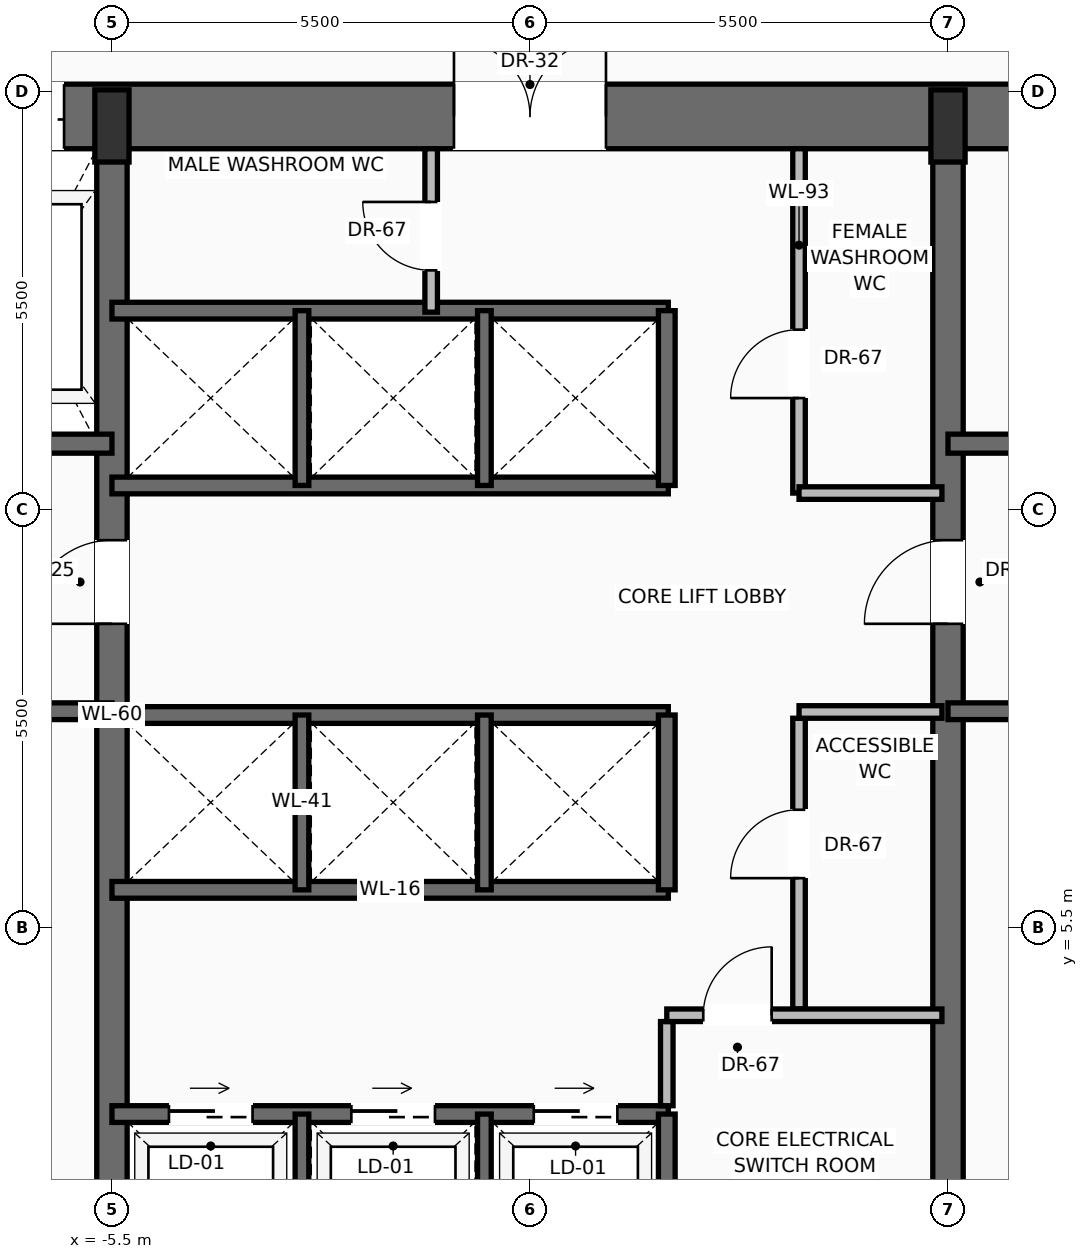
"""IFC4 building model, lengths in metres.
Left out: names, types, materials, properties, quantities, classifications, styles, units other than length and angle.
Written with IfcOpenShell. Run it as: python <this file> out.ifc"""

import sys

from ifc_helpers import new_model, si_unit, direction, frame, frame_2d, origin, origin_2d, place, context, subcontext, project, spatial, rectangle, extrude, source, transform, mapped, element, fill, save


model = new_model("IFC4")
c1 = context("Model", 3, precision=1e-05, world=origin(), true_north=direction((0.0, 1.0)))
c2 = subcontext(c1, "Body", "Model", "MODEL_VIEW")
j1 = project(units=[si_unit("LENGTHUNIT", "METRE"), si_unit("PLANEANGLEUNIT", "RADIAN")], contexts=[c1])
p1 = place(None, origin())
s1 = spatial("IfcSite", under=j1, at=p1, CompositionType="ELEMENT")
p2 = place(p1, origin())
s2 = spatial("IfcBuilding", under=s1, at=p2, CompositionType="ELEMENT")
p3 = place(p2, frame((0.0, 0.0, 34.9)))
s3 = spatial("IfcBuildingStorey", under=s2, at=p3, CompositionType="ELEMENT", Elevation=34.9)
p4 = place(p3, frame((-11.0, 16.175, 0.0), z_axis=(0.0, 0.0, 1.0), x_axis=(1.0, 0.0, 0.0)))
e1 = element("IfcWall", 1, at=p4, inside=s3, PredefinedType="SHEAR", context=c2, shape_type="SweptSolid", body=[
    extrude(rectangle(XDim=22.0, YDim=0.85, at=frame_2d((11.0, 0.0))), origin(), (0.0, 0.0, 1.0), 3.45),
])
p5 = place(p4, frame((3.57, 0.0, 0.0)))
e2 = element("IfcOpeningElement", 2, at=p5, cuts=e1, PredefinedType="OPENING", context=c2, shape_type="SweptSolid", body=[
    extrude(rectangle(XDim=1.3, YDim=2.3, at=frame_2d((0.65, 1.15))), frame((0.0, 0.435, 0.0), z_axis=(0.0, -1.0, 0.0), x_axis=(1.0, 0.0, 0.0)), (0.0, 0.0, 1.0), 0.87),
])
p6 = place(p4, frame((10.0, 0.0, 0.0)))
e3 = element("IfcOpeningElement", 3, at=p6, cuts=e1, PredefinedType="OPENING", context=c2, shape_type="SweptSolid", body=[
    extrude(rectangle(XDim=2.0, YDim=2.4, at=frame_2d((1.0, 1.2))), frame((0.0, 0.435, 0.0), z_axis=(0.0, -1.0, 0.0), x_axis=(1.0, 0.0, 0.0)), (0.0, 0.0, 1.0), 0.87),
])
p7 = place(p3, frame((-5.5, 0.425, 0.0), z_axis=(0.0, 0.0, 1.0), x_axis=(0.0, 1.0, 0.0)))
e4 = element("IfcWall", 4, at=p7, inside=s3, PredefinedType="SHEAR", context=c2, shape_type="SweptSolid", body=[
    extrude(rectangle(XDim=15.75, YDim=0.4, at=frame_2d((7.875, 0.0))), origin(), (0.0, 0.0, 1.0), 3.45),
])
p8 = place(p7, frame((9.075, 0.0, 0.0)))
e5 = element("IfcOpeningElement", 5, at=p8, cuts=e4, PredefinedType="OPENING", context=c2, shape_type="SweptSolid", body=[
    extrude(rectangle(XDim=1.1, YDim=2.2, at=frame_2d((0.55, 1.1))), frame((0.0, 0.21, 0.0), z_axis=(0.0, -1.0, 0.0), x_axis=(1.0, 0.0, 0.0)), (0.0, 0.0, 1.0), 0.42),
])
p9 = place(p3, frame((5.5, 0.425, 0.0), z_axis=(0.0, 0.0, 1.0), x_axis=(0.0, 1.0, 0.0)))
e6 = element("IfcWall", 6, at=p9, inside=s3, PredefinedType="SHEAR", context=c2, shape_type="SweptSolid", body=[
    extrude(rectangle(XDim=15.75, YDim=0.4, at=frame_2d((7.875, 0.0))), origin(), (0.0, 0.0, 1.0), 3.45),
])
p10 = place(p9, frame((9.075, 0.0, 0.0)))
e7 = element("IfcOpeningElement", 7, at=p10, cuts=e6, PredefinedType="OPENING", context=c2, shape_type="SweptSolid", body=[
    extrude(rectangle(XDim=1.1, YDim=2.2, at=frame_2d((0.55, 1.1))), frame((0.0, 0.21, 0.0), z_axis=(0.0, -1.0, 0.0), x_axis=(1.0, 0.0, 0.0)), (0.0, 0.0, 1.0), 0.42),
])
m1 = source(origin(), c2, "Body", "SweptSolid", [
    extrude(rectangle(XDim=0.45, YDim=0.95, at=origin_2d()), origin(), (0.0, 0.0, 1.0), 3.7),
])
for number, where, z_axis, x_axis in (
    (8, (-5.5, 16.05, 0.0), (0.0, 0.0, 1.0), (1.0, 0.0, 0.0)),
    (9, (5.5, 16.05, 0.0), (0.0, 0.0, 1.0), (1.0, 0.0, 0.0)),
):
    element("IfcColumn", number, at=place(p3, frame(where, z_axis=z_axis, x_axis=x_axis)), inside=s3, PredefinedType="PILASTER", context=c2, shape_type="MappedRepresentation", body=[
        mapped(m1, transform((0.0, 0.0, 0.0), scale=1.0)),
    ])
p11 = place(p3, frame((-5.5, 8.35, 0.0), z_axis=(0.0, 0.0, 1.0), x_axis=(-1.0, 0.0, 0.0)))
e10 = element("IfcWall", 10, at=p11, inside=s3, PredefinedType="SOLIDWALL", context=c2, shape_type="SweptSolid", body=[
    extrude(rectangle(XDim=4.65, YDim=0.22, at=frame_2d((2.325, 0.0))), origin(), (0.0, 0.0, 1.0), 3.45),
])
p12 = place(p11, frame((2.5, 0.0, 0.0)))
e11 = element("IfcOpeningElement", 11, at=p12, cuts=e10, PredefinedType="OPENING", context=c2, shape_type="SweptSolid", body=[
    extrude(rectangle(XDim=1.15, YDim=2.2, at=frame_2d((0.575, 1.1))), frame((0.0, 0.12, 0.0), z_axis=(0.0, -1.0, 0.0), x_axis=(1.0, 0.0, 0.0)), (0.0, 0.0, 1.0), 0.24),
])
p13 = place(p3, frame((-5.5, 11.87, 0.0), z_axis=(0.0, 0.0, 1.0), x_axis=(-1.0, 0.0, 0.0)))
e12 = element("IfcWall", 12, at=p13, inside=s3, PredefinedType="SOLIDWALL", context=c2, shape_type="SweptSolid", body=[
    extrude(rectangle(XDim=4.65, YDim=0.25, at=frame_2d((2.325, 0.0))), origin(), (0.0, 0.0, 1.0), 3.45),
])
p14 = place(p13, frame((2.95, 0.0, 0.0)))
e13 = element("IfcOpeningElement", 13, at=p14, cuts=e12, PredefinedType="OPENING", context=c2, shape_type="SweptSolid", body=[
    extrude(rectangle(XDim=1.2, YDim=2.25, at=frame_2d((0.6, 1.125))), frame((0.0, 0.135, 0.0), z_axis=(0.0, -1.0, 0.0), x_axis=(1.0, 0.0, 0.0)), (0.0, 0.0, 1.0), 0.27),
])
p15 = place(p3, frame((10.15, 8.35, 0.0), z_axis=(0.0, 0.0, 1.0), x_axis=(-1.0, 0.0, 0.0)))
e14 = element("IfcWall", 14, at=p15, inside=s3, PredefinedType="SOLIDWALL", context=c2, shape_type="SweptSolid", body=[
    extrude(rectangle(XDim=4.65, YDim=0.22, at=frame_2d((2.325, 0.0))), origin(), (0.0, 0.0, 1.0), 3.45),
])
p16 = place(p15, frame((1.0, 0.0, 0.0)))
e15 = element("IfcOpeningElement", 15, at=p16, cuts=e14, PredefinedType="OPENING", context=c2, shape_type="SweptSolid", body=[
    extrude(rectangle(XDim=1.15, YDim=2.2, at=frame_2d((0.575, 1.1))), frame((0.0, 0.12, 0.0), z_axis=(0.0, -1.0, 0.0), x_axis=(1.0, 0.0, 0.0)), (0.0, 0.0, 1.0), 0.24),
])
p17 = place(p3, frame((10.15, 11.87, 0.0), z_axis=(0.0, 0.0, 1.0), x_axis=(-1.0, 0.0, 0.0)))
e16 = element("IfcWall", 16, at=p17, inside=s3, PredefinedType="SOLIDWALL", context=c2, shape_type="SweptSolid", body=[
    extrude(rectangle(XDim=4.65, YDim=0.25, at=frame_2d((2.325, 0.0))), origin(), (0.0, 0.0, 1.0), 3.45),
])
p18 = place(p17, frame((0.5, 0.0, 0.0)))
e17 = element("IfcOpeningElement", 17, at=p18, cuts=e16, PredefinedType="OPENING", context=c2, shape_type="SweptSolid", body=[
    extrude(rectangle(XDim=1.2, YDim=2.25, at=frame_2d((0.6, 1.125))), frame((0.0, 0.135, 0.0), z_axis=(0.0, -1.0, 0.0), x_axis=(1.0, 0.0, 0.0)), (0.0, 0.0, 1.0), 0.27),
])
p19 = place(p3, frame((-5.5, 3.05, 0.0), z_axis=(0.0, 0.0, 1.0), x_axis=(1.0, 0.0, 0.0)))
e18 = element("IfcWall", 18, at=p19, inside=s3, PredefinedType="SOLIDWALL", context=c2, shape_type="SweptSolid", body=[
    extrude(rectangle(XDim=7.32, YDim=0.22, at=frame_2d((3.66, 0.0))), origin(), (0.0, 0.0, 1.0), 3.45),
])
p20 = place(p19, frame((0.75, 0.0, 0.0)))
e19 = element("IfcOpeningElement", 19, at=p20, cuts=e18, PredefinedType="OPENING", context=c2, shape_type="SweptSolid", body=[
    extrude(rectangle(XDim=1.1, YDim=2.2, at=frame_2d((0.55, 1.1))), frame((0.0, 0.12, 0.0), z_axis=(0.0, -1.0, 0.0), x_axis=(1.0, 0.0, 0.0)), (0.0, 0.0, 1.0), 0.24),
])
p21 = place(p19, frame((3.15, 0.0, 0.0)))
e20 = element("IfcOpeningElement", 20, at=p21, cuts=e18, PredefinedType="OPENING", context=c2, shape_type="SweptSolid", body=[
    extrude(rectangle(XDim=1.1, YDim=2.2, at=frame_2d((0.55, 1.1))), frame((0.0, 0.12, 0.0), z_axis=(0.0, -1.0, 0.0), x_axis=(1.0, 0.0, 0.0)), (0.0, 0.0, 1.0), 0.24),
])
p22 = place(p19, frame((5.55, 0.0, 0.0)))
e21 = element("IfcOpeningElement", 21, at=p22, cuts=e18, PredefinedType="OPENING", context=c2, shape_type="SweptSolid", body=[
    extrude(rectangle(XDim=1.1, YDim=2.2, at=frame_2d((0.55, 1.1))), frame((0.0, 0.12, 0.0), z_axis=(0.0, -1.0, 0.0), x_axis=(1.0, 0.0, 0.0)), (0.0, 0.0, 1.0), 0.24),
])
p23 = place(p3, frame((1.8, 0.85, 0.0), z_axis=(0.0, 0.0, 1.0), x_axis=(0.0, 1.0, 0.0)))
e22 = element("IfcWall", 22, at=p23, inside=s3, PredefinedType="SOLIDWALL", context=c2, shape_type="SweptSolid", body=[
    extrude(rectangle(XDim=2.2, YDim=0.22, at=frame_2d((1.1, 0.0))), origin(), (0.0, 0.0, 1.0), 3.45),
])
for number, where, z_axis, x_axis in (
    (23, (-3.0, 0.85, 0.0), (0.0, 0.0, 1.0), (0.0, 1.0, 0.0)),
    (24, (-0.6, 0.85, 0.0), (0.0, 0.0, 1.0), (0.0, 1.0, 0.0)),
):
    element("IfcWall", number, at=place(p3, frame(where, z_axis=z_axis, x_axis=x_axis)), inside=s3, PredefinedType="SOLIDWALL", context=c2, shape_type="SweptSolid", body=[
        extrude(rectangle(XDim=2.2, YDim=0.18, at=frame_2d((1.1, 0.0))), origin(), (0.0, 0.0, 1.0), 3.45),
    ])
p24 = place(p3, frame((1.8, 3.16, 0.0), z_axis=(0.0, 0.0, 1.0), x_axis=(0.0, 1.0, 0.0)))
e25 = element("IfcWall", 25, at=p24, inside=s3, PredefinedType="PARTITIONING", context=c2, shape_type="SweptSolid", body=[
    extrude(rectangle(XDim=1.108, YDim=0.165, at=frame_2d((0.554, 0.0))), origin(), (0.0, 0.0, 1.0), 3.442),
])
p25 = place(p3, frame((3.54, 4.433, 0.0), z_axis=(0.0, 0.0, 1.0), x_axis=(0.0, 1.0, 0.0)))
e26 = element("IfcWall", 26, at=p25, inside=s3, PredefinedType="PARTITIONING", context=c2, shape_type="SweptSolid", body=[
    extrude(rectangle(XDim=3.825, YDim=0.165, at=frame_2d((1.913, 0.0))), origin(), (0.0, 0.0, 1.0), 3.442),
])
p26 = place(p25, frame((1.721, 0.0, 0.0)))
e27 = element("IfcOpeningElement", 27, at=p26, cuts=e26, PredefinedType="OPENING", context=c2, shape_type="SweptSolid", body=[
    extrude(rectangle(XDim=0.9, YDim=2.1, at=frame_2d((0.45, 1.05))), frame((0.0, 0.093, 0.0), z_axis=(0.0, -1.0, 0.0), x_axis=(1.0, 0.0, 0.0)), (0.0, 0.0, 1.0), 0.185),
])
p27 = place(p3, frame((3.54, 8.34, 0.0), z_axis=(0.0, 0.0, 1.0), x_axis=(1.0, 0.0, 0.0)))
e28 = element("IfcWall", 28, at=p27, inside=s3, PredefinedType="PARTITIONING", context=c2, shape_type="SweptSolid", body=[
    extrude(rectangle(XDim=1.88, YDim=0.165, at=frame_2d((0.94, 0.0))), origin(), (0.0, 0.0, 1.0), 3.442),
])
p28 = place(p3, frame((1.8, 4.35, 0.0), z_axis=(0.0, 0.0, 1.0), x_axis=(1.0, 0.0, 0.0)))
e29 = element("IfcWall", 29, at=p28, inside=s3, PredefinedType="PARTITIONING", context=c2, shape_type="SweptSolid", body=[
    extrude(rectangle(XDim=3.62, YDim=0.165, at=frame_2d((1.81, 0.0))), origin(), (0.0, 0.0, 1.0), 3.442),
])
p29 = place(p28, frame((0.48, 0.0, 0.0)))
e30 = element("IfcOpeningElement", 30, at=p29, cuts=e29, PredefinedType="OPENING", context=c2, shape_type="SweptSolid", body=[
    extrude(rectangle(XDim=0.9, YDim=2.1, at=frame_2d((0.45, 1.05))), frame((0.0, 0.093, 0.0), z_axis=(0.0, -1.0, 0.0), x_axis=(1.0, 0.0, 0.0)), (0.0, 0.0, 1.0), 0.185),
])
for number, where, z_axis, x_axis in (
    (31, (-5.5, 6.0, 0.0), (0.0, 0.0, 1.0), (1.0, 0.0, 0.0)),
    (32, (-5.5, 8.3, 0.0), (0.0, 0.0, 1.0), (1.0, 0.0, 0.0)),
):
    element("IfcWall", number, at=place(p3, frame(where, z_axis=z_axis, x_axis=x_axis)), inside=s3, PredefinedType="SOLIDWALL", context=c2, shape_type="SweptSolid", body=[
        extrude(rectangle(XDim=7.32, YDim=0.22, at=frame_2d((3.66, 0.0))), origin(), (0.0, 0.0, 1.0), 3.45),
    ])
p30 = place(p3, frame((1.8, 6.0, 0.0), z_axis=(0.0, 0.0, 1.0), x_axis=(0.0, 1.0, 0.0)))
e33 = element("IfcWall", 33, at=p30, inside=s3, PredefinedType="SOLIDWALL", context=c2, shape_type="SweptSolid", body=[
    extrude(rectangle(XDim=2.3, YDim=0.22, at=frame_2d((1.15, 0.0))), origin(), (0.0, 0.0, 1.0), 3.45),
])
for number, where, z_axis, x_axis in (
    (34, (-3.0, 6.0, 0.0), (0.0, 0.0, 1.0), (0.0, 1.0, 0.0)),
    (35, (-0.6, 6.0, 0.0), (0.0, 0.0, 1.0), (0.0, 1.0, 0.0)),
):
    element("IfcWall", number, at=place(p3, frame(where, z_axis=z_axis, x_axis=x_axis)), inside=s3, PredefinedType="SOLIDWALL", context=c2, shape_type="SweptSolid", body=[
        extrude(rectangle(XDim=2.3, YDim=0.18, at=frame_2d((1.15, 0.0))), origin(), (0.0, 0.0, 1.0), 3.45),
    ])
for number, where, z_axis, x_axis in (
    (36, (-5.5, 11.32, 0.0), (0.0, 0.0, 1.0), (1.0, 0.0, 0.0)),
    (37, (-5.5, 13.62, 0.0), (0.0, 0.0, 1.0), (1.0, 0.0, 0.0)),
):
    element("IfcWall", number, at=place(p3, frame(where, z_axis=z_axis, x_axis=x_axis)), inside=s3, PredefinedType="SOLIDWALL", context=c2, shape_type="SweptSolid", body=[
        extrude(rectangle(XDim=7.32, YDim=0.22, at=frame_2d((3.66, 0.0))), origin(), (0.0, 0.0, 1.0), 3.45),
    ])
p31 = place(p3, frame((1.8, 11.32, 0.0), z_axis=(0.0, 0.0, 1.0), x_axis=(0.0, 1.0, 0.0)))
e38 = element("IfcWall", 38, at=p31, inside=s3, PredefinedType="SOLIDWALL", context=c2, shape_type="SweptSolid", body=[
    extrude(rectangle(XDim=2.3, YDim=0.22, at=frame_2d((1.15, 0.0))), origin(), (0.0, 0.0, 1.0), 3.45),
])
for number, where, z_axis, x_axis in (
    (39, (-3.0, 11.32, 0.0), (0.0, 0.0, 1.0), (0.0, 1.0, 0.0)),
    (40, (-0.6, 11.32, 0.0), (0.0, 0.0, 1.0), (0.0, 1.0, 0.0)),
):
    element("IfcWall", number, at=place(p3, frame(where, z_axis=z_axis, x_axis=x_axis)), inside=s3, PredefinedType="SOLIDWALL", context=c2, shape_type="SweptSolid", body=[
        extrude(rectangle(XDim=2.3, YDim=0.18, at=frame_2d((1.15, 0.0))), origin(), (0.0, 0.0, 1.0), 3.45),
    ])
p32 = place(p3, frame((-1.3, 13.6, 0.0), z_axis=(0.0, 0.0, 1.0), x_axis=(0.0, 1.0, 0.0)))
e41 = element("IfcWall", 41, at=p32, inside=s3, PredefinedType="PARTITIONING", context=c2, shape_type="SweptSolid", body=[
    extrude(rectangle(XDim=2.15, YDim=0.165, at=frame_2d((1.075, 0.0))), origin(), (0.0, 0.0, 1.0), 3.442),
])
p33 = place(p32, frame((0.55, 0.0, 0.0)))
e42 = element("IfcOpeningElement", 42, at=p33, cuts=e41, PredefinedType="OPENING", context=c2, shape_type="SweptSolid", body=[
    extrude(rectangle(XDim=0.9, YDim=2.1, at=frame_2d((0.45, 1.05))), frame((0.0, 0.093, 0.0), z_axis=(0.0, -1.0, 0.0), x_axis=(1.0, 0.0, 0.0)), (0.0, 0.0, 1.0), 0.185),
])
p34 = place(p3, frame((3.54, 11.22, 0.0), z_axis=(0.0, 0.0, 1.0), x_axis=(0.0, 1.0, 0.0)))
e43 = element("IfcWall", 43, at=p34, inside=s3, PredefinedType="PARTITIONING", context=c2, shape_type="SweptSolid", body=[
    extrude(rectangle(XDim=4.53, YDim=0.165, at=frame_2d((2.265, 0.0))), origin(), (0.0, 0.0, 1.0), 3.442),
])
p35 = place(p34, frame((1.25, 0.0, 0.0)))
e44 = element("IfcOpeningElement", 44, at=p35, cuts=e43, PredefinedType="OPENING", context=c2, shape_type="SweptSolid", body=[
    extrude(rectangle(XDim=0.9, YDim=2.1, at=frame_2d((0.45, 1.05))), frame((0.0, 0.093, 0.0), z_axis=(0.0, -1.0, 0.0), x_axis=(1.0, 0.0, 0.0)), (0.0, 0.0, 1.0), 0.185),
])
p36 = place(p3, frame((3.54, 11.22, 0.0), z_axis=(0.0, 0.0, 1.0), x_axis=(1.0, 0.0, 0.0)))
e45 = element("IfcWall", 45, at=p36, inside=s3, PredefinedType="PARTITIONING", context=c2, shape_type="SweptSolid", body=[
    extrude(rectangle(XDim=1.88, YDim=0.165, at=frame_2d((0.94, 0.0))), origin(), (0.0, 0.0, 1.0), 3.442),
])
m2 = source(origin(), c2, "Body", "SweptSolid", [
    extrude(rectangle(XDim=1.1, YDim=2.2, at=frame_2d((0.55, 1.1))), frame((0.0, 0.025, 0.0), z_axis=(0.0, -1.0, 0.0), x_axis=(1.0, 0.0, 0.0)), (0.0, 0.0, 1.0), 0.05),
])
p37 = place(p8, origin())
e46 = element("IfcDoor", 46, at=p37, inside=s3, OperationType="SINGLE_SWING_LEFT", PredefinedType="DOOR", context=c2, shape_type="MappedRepresentation", body=[
    mapped(m2, transform((0.0, 0.0, 0.0), scale=1.0)),
])
fill(e5, e46)
m3 = source(origin(), c2, "Body", "SweptSolid", [
    extrude(rectangle(XDim=1.3, YDim=2.3, at=frame_2d((0.65, 1.15))), frame((0.0, 0.025, 0.0), z_axis=(0.0, -1.0, 0.0), x_axis=(1.0, 0.0, 0.0)), (0.0, 0.0, 1.0), 0.05),
])
p38 = place(p5, origin())
e47 = element("IfcDoor", 47, at=p38, inside=s3, OperationType="SLIDING_TO_RIGHT", PredefinedType="DOOR", context=c2, shape_type="MappedRepresentation", body=[
    mapped(m3, transform((0.0, 0.0, 0.0), scale=1.0)),
])
fill(e2, e47)
p39 = place(p10, origin())
e48 = element("IfcDoor", 48, at=p39, inside=s3, OperationType="SINGLE_SWING_LEFT", PredefinedType="DOOR", context=c2, shape_type="MappedRepresentation", body=[
    mapped(m2, transform((0.0, 0.0, 0.0), scale=1.0)),
])
fill(e7, e48)
m4 = source(origin(), c2, "Body", "SweptSolid", [
    extrude(rectangle(XDim=2.0, YDim=2.4, at=frame_2d((1.0, 1.2))), frame((0.0, 0.025, 0.0), z_axis=(0.0, -1.0, 0.0), x_axis=(1.0, 0.0, 0.0)), (0.0, 0.0, 1.0), 0.05),
])
p40 = place(p6, origin())
e49 = element("IfcDoor", 49, at=p40, inside=s3, OperationType="DOUBLE_DOOR_SINGLE_SWING", PredefinedType="DOOR", context=c2, shape_type="MappedRepresentation", body=[
    mapped(m4, transform((0.0, 0.0, 0.0), scale=1.0)),
])
fill(e3, e49)
m5 = source(origin(), c2, "Body", "SweptSolid", [
    extrude(rectangle(XDim=1.1, YDim=2.2, at=frame_2d((0.55, 1.1))), frame((0.0, 0.025, 0.0), z_axis=(0.0, -1.0, 0.0), x_axis=(1.0, 0.0, 0.0)), (0.0, 0.0, 1.0), 0.05),
])
p41 = place(p20, origin())
e50 = element("IfcDoor", 50, at=p41, inside=s3, OperationType="SLIDING_TO_RIGHT", PredefinedType="DOOR", context=c2, shape_type="MappedRepresentation", body=[
    mapped(m5, transform((0.0, 0.0, 0.0), scale=1.0)),
])
fill(e19, e50)
p42 = place(p21, origin())
e51 = element("IfcDoor", 51, at=p42, inside=s3, OperationType="SLIDING_TO_RIGHT", PredefinedType="DOOR", context=c2, shape_type="MappedRepresentation", body=[
    mapped(m5, transform((0.0, 0.0, 0.0), scale=1.0)),
])
fill(e20, e51)
p43 = place(p22, origin())
e52 = element("IfcDoor", 52, at=p43, inside=s3, OperationType="SLIDING_TO_RIGHT", PredefinedType="DOOR", context=c2, shape_type="MappedRepresentation", body=[
    mapped(m5, transform((0.0, 0.0, 0.0), scale=1.0)),
])
fill(e21, e52)
m6 = source(origin(), c2, "Body", "SweptSolid", [
    extrude(rectangle(XDim=0.9, YDim=2.1, at=frame_2d((0.45, 1.05))), frame((0.0, 0.025, 0.0), z_axis=(0.0, -1.0, 0.0), x_axis=(1.0, 0.0, 0.0)), (0.0, 0.0, 1.0), 0.05),
])
p44 = place(p29, origin())
e53 = element("IfcDoor", 53, at=p44, inside=s3, OperationType="SINGLE_SWING_RIGHT", PredefinedType="DOOR", context=c2, shape_type="MappedRepresentation", body=[
    mapped(m6, transform((0.0, 0.0, 0.0), scale=1.0)),
])
fill(e30, e53)
p45 = place(p26, origin())
e54 = element("IfcDoor", 54, at=p45, inside=s3, OperationType="SINGLE_SWING_LEFT", PredefinedType="DOOR", context=c2, shape_type="MappedRepresentation", body=[
    mapped(m6, transform((0.0, 0.0, 0.0), scale=1.0)),
])
fill(e27, e54)
p46 = place(p33, origin())
e55 = element("IfcDoor", 55, at=p46, inside=s3, OperationType="SINGLE_SWING_RIGHT", PredefinedType="DOOR", context=c2, shape_type="MappedRepresentation", body=[
    mapped(m6, transform((0.0, 0.0, 0.0), scale=1.0)),
])
fill(e42, e55)
p47 = place(p35, origin())
e56 = element("IfcDoor", 56, at=p47, inside=s3, OperationType="SINGLE_SWING_LEFT", PredefinedType="DOOR", context=c2, shape_type="MappedRepresentation", body=[
    mapped(m6, transform((0.0, 0.0, 0.0), scale=1.0)),
])
fill(e44, e56)
save(model, sys.argv[1])
